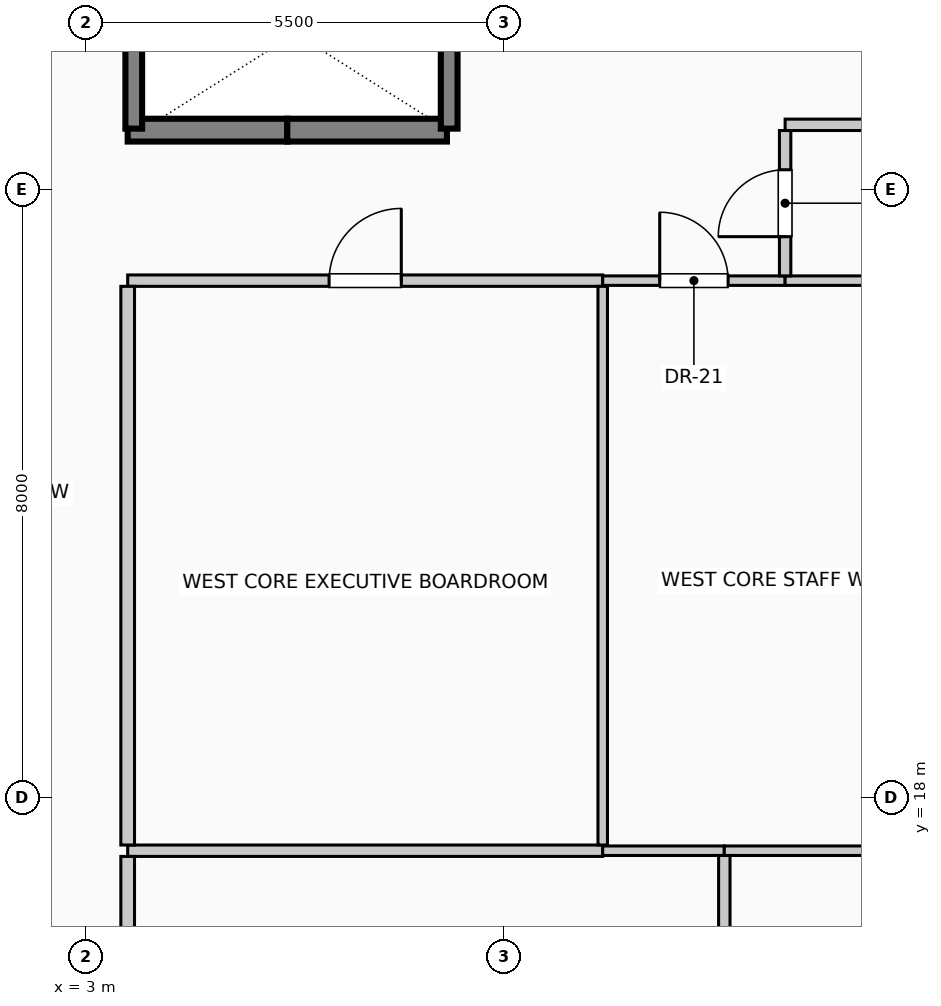
"""IFC4 building model, lengths in metres.
Left out: names, types, materials, properties, quantities, classifications, styles, units other than length and angle.
Written with IfcOpenShell. Run it as: python <this file> out.ifc"""

import sys

from ifc_helpers import new_model, si_unit, direction, frame, frame_2d, origin, place, context, subcontext, project, spatial, rectangle, extrude, element, fill, save


model = new_model("IFC4")
c1 = context("Model", 3, precision=1e-05, world=origin(), true_north=direction((0.0, 1.0)))
c2 = subcontext(c1, "Body", "Model", "MODEL_VIEW")
j1 = project(units=[si_unit("LENGTHUNIT", "METRE"), si_unit("PLANEANGLEUNIT", "RADIAN")], contexts=[c1])
p1 = place(None, origin())
s1 = spatial("IfcSite", under=j1, at=p1, CompositionType="ELEMENT")
p2 = place(p1, origin())
s2 = spatial("IfcBuilding", under=s1, at=p2, CompositionType="ELEMENT")
p3 = place(p2, frame((0.0, 0.0, 194.6)))
s3 = spatial("IfcBuildingStorey", under=s2, at=p3, CompositionType="ELEMENT", Elevation=194.6)
p4 = place(p3, frame((5.65, 26.78, 0.0), z_axis=(0.0, 0.0, 1.0), x_axis=(-1.0, 0.0, 0.0)))
e1 = element("IfcWall", 1, at=p4, inside=s3, PredefinedType="SOLIDWALL", context=c2, shape_type="SweptSolid", body=[
    extrude(rectangle(XDim=2.1, YDim=0.3, at=frame_2d((1.05, 0.0))), origin(), (0.0, 0.0, 1.0), 4.0),
])
p5 = place(p3, frame((7.75, 26.78, 0.0), z_axis=(0.0, 0.0, 1.0), x_axis=(-1.0, 0.0, 0.0)))
e2 = element("IfcWall", 2, at=p5, inside=s3, PredefinedType="SOLIDWALL", context=c2, shape_type="SweptSolid", body=[
    extrude(rectangle(XDim=2.1, YDim=0.3, at=frame_2d((1.05, 0.0))), origin(), (0.0, 0.0, 1.0), 4.0),
])
p6 = place(p3, frame((3.63, 26.8, 0.0), z_axis=(0.0, 0.0, 1.0), x_axis=(0.0, 1.0, 0.0)))
e3 = element("IfcWall", 3, at=p6, inside=s3, PredefinedType="SOLIDWALL", context=c2, shape_type="SweptSolid", body=[
    extrude(rectangle(XDim=5.55, YDim=0.22, at=frame_2d((2.775, 0.0))), origin(), (0.0, 0.0, 1.0), 4.0),
])
p7 = place(p3, frame((7.78, 26.8, 0.0), z_axis=(0.0, 0.0, 1.0), x_axis=(0.0, 1.0, 0.0)))
e4 = element("IfcWall", 4, at=p7, inside=s3, PredefinedType="SOLIDWALL", context=c2, shape_type="SweptSolid", body=[
    extrude(rectangle(XDim=2.8, YDim=0.22, at=frame_2d((1.4, 0.0))), origin(), (0.0, 0.0, 1.0), 4.0),
])
p8 = place(p3, frame((3.55, 17.3, 0.0), z_axis=(0.0, 0.0, 1.0), x_axis=(1.0, 0.0, 0.0)))
e5 = element("IfcWall", 5, at=p8, inside=s3, PredefinedType="PARTITIONING", context=c2, shape_type="SweptSolid", body=[
    extrude(rectangle(XDim=6.25, YDim=0.15, at=frame_2d((3.125, 0.0))), origin(), (0.0, 0.0, 1.0), 3.75),
])
p9 = place(p3, frame((9.8, 17.3, 0.0), z_axis=(0.0, 0.0, 1.0), x_axis=(1.0, 0.0, 0.0)))
e6 = element("IfcWall", 6, at=p9, inside=s3, PredefinedType="PARTITIONING", context=c2, shape_type="SweptSolid", body=[
    extrude(rectangle(XDim=1.6, YDim=0.125, at=frame_2d((0.8, 0.0))), origin(), (0.0, 0.0, 1.0), 3.75),
])
p10 = place(p3, frame((11.4, 17.3, 0.0), z_axis=(0.0, 0.0, 1.0), x_axis=(1.0, 0.0, 0.0)))
e7 = element("IfcWall", 7, at=p10, inside=s3, PredefinedType="PARTITIONING", context=c2, shape_type="SweptSolid", body=[
    extrude(rectangle(XDim=4.45, YDim=0.125, at=frame_2d((2.225, 0.0))), origin(), (0.0, 0.0, 1.0), 3.75),
])
p11 = place(p3, frame((3.55, 24.8, 0.0), z_axis=(0.0, 0.0, 1.0), x_axis=(1.0, 0.0, 0.0)))
e8 = element("IfcWall", 8, at=p11, inside=s3, PredefinedType="PARTITIONING", context=c2, shape_type="SweptSolid", body=[
    extrude(rectangle(XDim=6.25, YDim=0.15, at=frame_2d((3.125, 0.0))), origin(), (0.0, 0.0, 1.0), 3.75),
])
p12 = place(p11, frame((2.65, 0.0, 0.0)))
e9 = element("IfcOpeningElement", 9, at=p12, cuts=e8, PredefinedType="OPENING", context=c2, shape_type="SweptSolid", body=[
    extrude(rectangle(XDim=0.95, YDim=2.15, at=frame_2d((0.475, 1.075))), frame((0.0, 0.085, 0.0), z_axis=(0.0, -1.0, 0.0), x_axis=(1.0, 0.0, 0.0)), (0.0, 0.0, 1.0), 0.17),
])
p13 = place(p3, frame((9.8, 24.8, 0.0), z_axis=(0.0, 0.0, 1.0), x_axis=(1.0, 0.0, 0.0)))
e10 = element("IfcWall", 10, at=p13, inside=s3, PredefinedType="PARTITIONING", context=c2, shape_type="SweptSolid", body=[
    extrude(rectangle(XDim=2.4, YDim=0.125, at=frame_2d((1.2, 0.0))), origin(), (0.0, 0.0, 1.0), 3.75),
])
p14 = place(p13, frame((0.75, 0.0, 0.0)))
e11 = element("IfcOpeningElement", 11, at=p14, cuts=e10, PredefinedType="OPENING", context=c2, shape_type="SweptSolid", body=[
    extrude(rectangle(XDim=0.9, YDim=2.1, at=frame_2d((0.45, 1.05))), frame((0.0, 0.073, 0.0), z_axis=(0.0, -1.0, 0.0), x_axis=(1.0, 0.0, 0.0)), (0.0, 0.0, 1.0), 0.145),
])
p15 = place(p3, frame((12.2, 24.8, 0.0), z_axis=(0.0, 0.0, 1.0), x_axis=(1.0, 0.0, 0.0)))
e12 = element("IfcWall", 12, at=p15, inside=s3, PredefinedType="PARTITIONING", context=c2, shape_type="SweptSolid", body=[
    extrude(rectangle(XDim=3.65, YDim=0.125, at=frame_2d((1.825, 0.0))), origin(), (0.0, 0.0, 1.0), 3.75),
])
p16 = place(p3, frame((12.2, 26.85, 0.0), z_axis=(0.0, 0.0, 1.0), x_axis=(1.0, 0.0, 0.0)))
e13 = element("IfcWall", 13, at=p16, inside=s3, PredefinedType="PARTITIONING", context=c2, shape_type="SweptSolid", body=[
    extrude(rectangle(XDim=8.8, YDim=0.15, at=frame_2d((4.4, 0.0))), origin(), (0.0, 0.0, 1.0), 3.75),
])
p17 = place(p3, frame((3.55, 10.39, 0.0), z_axis=(0.0, 0.0, 1.0), x_axis=(0.0, 1.0, 0.0)))
e14 = element("IfcWall", 14, at=p17, inside=s3, PredefinedType="PARTITIONING", context=c2, shape_type="SweptSolid", body=[
    extrude(rectangle(XDim=6.835, YDim=0.18, at=frame_2d((3.417, 0.0))), origin(), (0.0, 0.0, 1.0), 3.75),
])
p18 = place(p3, frame((3.55, 17.375, 0.0), z_axis=(0.0, 0.0, 1.0), x_axis=(0.0, 1.0, 0.0)))
e15 = element("IfcWall", 15, at=p18, inside=s3, PredefinedType="PARTITIONING", context=c2, shape_type="SweptSolid", body=[
    extrude(rectangle(XDim=7.35, YDim=0.18, at=frame_2d((3.675, 0.0))), origin(), (0.0, 0.0, 1.0), 3.75),
])
p19 = place(p3, frame((9.8, 17.375, 0.0), z_axis=(0.0, 0.0, 1.0), x_axis=(0.0, 1.0, 0.0)))
e16 = element("IfcWall", 16, at=p19, inside=s3, PredefinedType="PARTITIONING", context=c2, shape_type="SweptSolid", body=[
    extrude(rectangle(XDim=7.35, YDim=0.125, at=frame_2d((3.675, 0.0))), origin(), (0.0, 0.0, 1.0), 3.75),
])
p20 = place(p3, frame((11.4, 10.39, 0.0), z_axis=(0.0, 0.0, 1.0), x_axis=(0.0, 1.0, 0.0)))
e17 = element("IfcWall", 17, at=p20, inside=s3, PredefinedType="PARTITIONING", context=c2, shape_type="SweptSolid", body=[
    extrude(rectangle(XDim=6.848, YDim=0.15, at=frame_2d((3.424, 0.0))), origin(), (0.0, 0.0, 1.0), 3.75),
])
p21 = place(p3, frame((12.2, 24.863, 0.0), z_axis=(0.0, 0.0, 1.0), x_axis=(0.0, 1.0, 0.0)))
e18 = element("IfcWall", 18, at=p21, inside=s3, PredefinedType="PARTITIONING", context=c2, shape_type="SweptSolid", body=[
    extrude(rectangle(XDim=1.912, YDim=0.15, at=frame_2d((0.956, 0.0))), origin(), (0.0, 0.0, 1.0), 3.75),
])
p22 = place(p21, frame((0.516, 0.0, 0.0)))
e19 = element("IfcOpeningElement", 19, at=p22, cuts=e18, PredefinedType="OPENING", context=c2, shape_type="SweptSolid", body=[
    extrude(rectangle(XDim=0.88, YDim=2.1, at=frame_2d((0.44, 1.05))), frame((0.0, 0.085, 0.0), z_axis=(0.0, -1.0, 0.0), x_axis=(1.0, 0.0, 0.0)), (0.0, 0.0, 1.0), 0.17),
])
p23 = place(p12, origin())
e20 = element("IfcDoor", 20, at=p23, inside=s3, OperationType="SINGLE_SWING_RIGHT", PredefinedType="DOOR", context=c2, shape_type="SweptSolid", body=[
    extrude(rectangle(XDim=0.95, YDim=2.15, at=frame_2d((0.475, 1.075))), frame((0.0, 0.025, 0.0), z_axis=(0.0, -1.0, 0.0), x_axis=(1.0, 0.0, 0.0)), (0.0, 0.0, 1.0), 0.05),
])
fill(e9, e20)
p24 = place(p14, origin())
e21 = element("IfcDoor", 21, at=p24, inside=s3, OperationType="SINGLE_SWING_LEFT", PredefinedType="DOOR", context=c2, shape_type="SweptSolid", body=[
    extrude(rectangle(XDim=0.9, YDim=2.1, at=frame_2d((0.45, 1.05))), frame((0.0, 0.025, 0.0), z_axis=(0.0, -1.0, 0.0), x_axis=(1.0, 0.0, 0.0)), (0.0, 0.0, 1.0), 0.05),
])
fill(e11, e21)
p25 = place(p22, origin())
e22 = element("IfcDoor", 22, at=p25, inside=s3, OperationType="SINGLE_SWING_LEFT", PredefinedType="DOOR", context=c2, shape_type="SweptSolid", body=[
    extrude(rectangle(XDim=0.88, YDim=2.1, at=frame_2d((0.44, 1.05))), frame((0.0, 0.025, 0.0), z_axis=(0.0, -1.0, 0.0), x_axis=(1.0, 0.0, 0.0)), (0.0, 0.0, 1.0), 0.05),
])
fill(e19, e22)
save(model, sys.argv[1])
